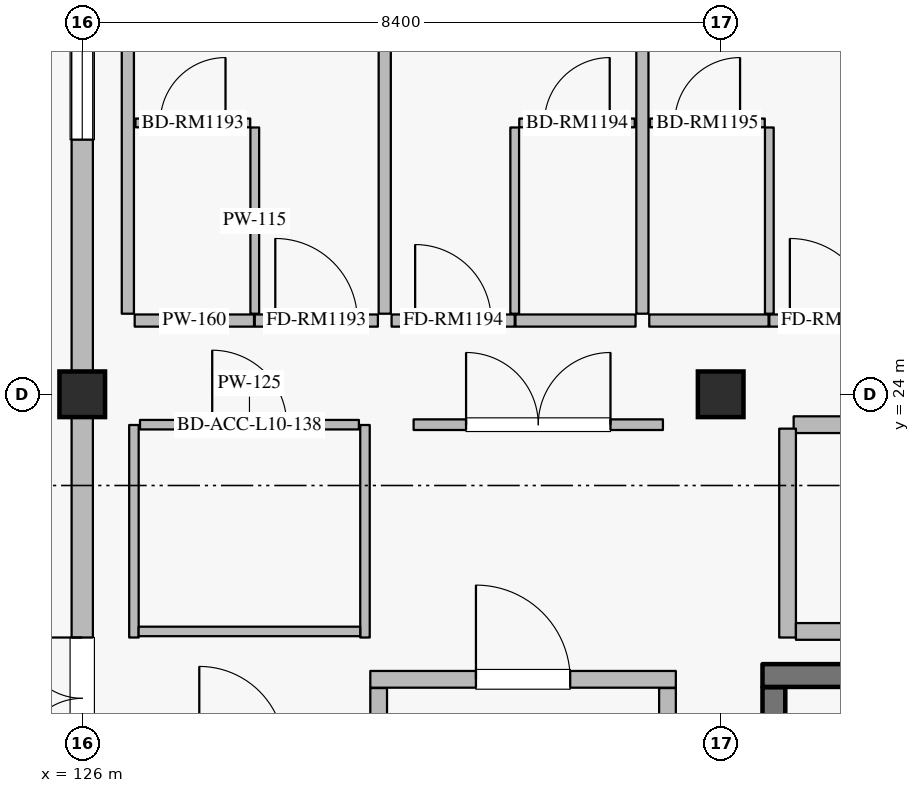
"""IFC4 building model, lengths in metres.
Left out: names, types, materials, properties, quantities, classifications, styles, units other than length and angle.
Written with IfcOpenShell. Run it as: python <this file> out.ifc"""

import sys

from ifc_helpers import new_model, si_unit, direction, frame, frame_2d, origin, origin_2d, place, context, subcontext, project, spatial, rectangle, extrude, element, fill, save


model = new_model("IFC4")
c1 = context("Model", 3, precision=1e-05, world=origin(), true_north=direction((0.0, 1.0)))
c2 = subcontext(c1, "Body", "Model", "MODEL_VIEW")
j1 = project(units=[si_unit("LENGTHUNIT", "METRE"), si_unit("PLANEANGLEUNIT", "RADIAN")], contexts=[c1])
p1 = place(None, origin())
s1 = spatial("IfcSite", under=j1, at=p1, CompositionType="ELEMENT")
p2 = place(p1, origin())
s2 = spatial("IfcBuilding", under=s1, at=p2, CompositionType="ELEMENT")
p3 = place(p2, frame((0.0, 0.0, 43.2)))
s3 = spatial("IfcBuildingStorey", under=s2, at=p3, CompositionType="ELEMENT", Elevation=43.2)
for number, where, z_axis, x_axis in (
    (1, (126.0, 24.0, 0.0), (0.0, 0.0, 1.0), (1.0, 0.0, 0.0)),
    (2, (134.4, 24.0, 0.0), (0.0, 0.0, 1.0), (1.0, 0.0, 0.0)),
):
    element("IfcColumn", number, at=place(p3, frame(where, z_axis=z_axis, x_axis=x_axis)), inside=s3, PredefinedType="COLUMN", context=c2, shape_type="SweptSolid", body=[
        extrude(rectangle(XDim=0.6, YDim=0.6, at=origin_2d()), origin(), (0.0, 0.0, 1.0), 4.2),
    ])
p4 = place(p3, frame((126.0, 16.3, 0.0), z_axis=(0.0, 0.0, 1.0), x_axis=(0.0, 1.0, 0.0)))
e3 = element("IfcWall", 3, at=p4, inside=s3, PredefinedType="SOLIDWALL", context=c2, shape_type="SweptSolid", body=[
    extrude(rectangle(XDim=7.4, YDim=0.28, at=frame_2d((3.7, 0.0))), origin(), (0.0, 0.0, 1.0), 3.3),
])
p5 = place(p4, frame((2.9, 0.0, 0.0)))
e4 = element("IfcOpeningElement", 4, at=p5, cuts=e3, PredefinedType="OPENING", context=c2, shape_type="SweptSolid", body=[
    extrude(rectangle(XDim=1.6, YDim=2.25, at=frame_2d((0.8, 1.125))), frame((0.0, 0.15, 0.0), z_axis=(0.0, -1.0, 0.0), x_axis=(1.0, 0.0, 0.0)), (0.0, 0.0, 1.0), 0.3),
])
p6 = place(p3, frame((126.0, 24.3, 0.0), z_axis=(0.0, 0.0, 1.0), x_axis=(0.0, 1.0, 0.0)))
e5 = element("IfcWall", 5, at=p6, inside=s3, PredefinedType="SOLIDWALL", context=c2, shape_type="SweptSolid", body=[
    extrude(rectangle(XDim=7.4, YDim=0.28, at=frame_2d((3.7, 0.0))), origin(), (0.0, 0.0, 1.0), 3.3),
])
p7 = place(p6, frame((3.05, 0.0, 0.75)))
e6 = element("IfcOpeningElement", 6, at=p7, cuts=e5, PredefinedType="OPENING", context=c2, shape_type="SweptSolid", body=[
    extrude(rectangle(XDim=1.3, YDim=1.65, at=frame_2d((0.65, 0.825))), frame((0.0, 0.15, 0.0), z_axis=(0.0, -1.0, 0.0), x_axis=(1.0, 0.0, 0.0)), (0.0, 0.0, 1.0), 0.3),
])
p8 = place(p3, frame((138.05, 20.3, 0.0), z_axis=(0.0, 0.0, 1.0), x_axis=(-1.0, 0.0, 0.0)))
e7 = element("IfcWall", 7, at=p8, inside=s3, PredefinedType="SHEAR", context=c2, shape_type="SweptSolid", body=[
    extrude(rectangle(XDim=3.1, YDim=0.3, at=frame_2d((1.55, 0.0))), origin(), (0.0, 0.0, 1.0), 3.935),
])
p9 = place(p3, frame((135.1, 20.145, 0.0), z_axis=(0.0, 0.0, 1.0), x_axis=(0.0, -1.0, 0.0)))
e8 = element("IfcWall", 8, at=p9, inside=s3, PredefinedType="SHEAR", context=c2, shape_type="SweptSolid", body=[
    extrude(rectangle(XDim=2.59, YDim=0.3, at=frame_2d((1.295, 0.0))), origin(), (0.0, 0.0, 1.0), 3.935),
])
p10 = place(p3, frame((129.9, 19.415, 0.0), z_axis=(0.0, 0.0, 1.0), x_axis=(0.0, 1.0, 0.0)))
e9 = element("IfcWall", 9, at=p10, inside=s3, PredefinedType="PARTITIONING", context=c2, shape_type="SweptSolid", body=[
    extrude(rectangle(XDim=0.72, YDim=0.22, at=frame_2d((0.36, 0.0))), origin(), (0.0, 0.0, 1.0), 3.935),
])
p11 = place(p3, frame((133.7, 16.605, 0.0), z_axis=(0.0, 0.0, 1.0), x_axis=(0.0, 1.0, 0.0)))
e10 = element("IfcWall", 10, at=p11, inside=s3, PredefinedType="PARTITIONING", context=c2, shape_type="SweptSolid", body=[
    extrude(rectangle(XDim=3.53, YDim=0.22, at=frame_2d((1.765, 0.0))), origin(), (0.0, 0.0, 1.0), 3.935),
])
p12 = place(p3, frame((129.79, 20.25, 0.0), z_axis=(0.0, 0.0, 1.0), x_axis=(1.0, 0.0, 0.0)))
e11 = element("IfcWall", 11, at=p12, inside=s3, PredefinedType="PARTITIONING", context=c2, shape_type="SweptSolid", body=[
    extrude(rectangle(XDim=4.02, YDim=0.22, at=frame_2d((2.01, 0.0))), origin(), (0.0, 0.0, 1.0), 3.935),
])
p13 = place(p12, frame((1.39, 0.0, 0.0)))
e12 = element("IfcOpeningElement", 12, at=p13, cuts=e11, PredefinedType="OPENING", context=c2, shape_type="SweptSolid", body=[
    extrude(rectangle(XDim=1.24, YDim=2.2, at=frame_2d((0.62, 1.1))), frame((0.0, 0.12, 0.0), z_axis=(0.0, -1.0, 0.0), x_axis=(1.0, 0.0, 0.0)), (0.0, 0.0, 1.0), 0.24),
])
p14 = place(p3, frame((126.69, 24.97, 0.0), z_axis=(0.0, 0.0, 1.0), x_axis=(1.0, 0.0, 0.0)))
e13 = element("IfcWall", 13, at=p14, inside=s3, PredefinedType="PARTITIONING", context=c2, shape_type="SweptSolid", body=[
    extrude(rectangle(XDim=1.57, YDim=0.16, at=frame_2d((0.785, 0.0))), origin(), (0.0, 0.0, 1.0), 3.935),
])
p15 = place(p3, frame((128.27, 24.97, 0.0), z_axis=(0.0, 0.0, 1.0), x_axis=(1.0, 0.0, 0.0)))
e14 = element("IfcWall", 14, at=p15, inside=s3, PredefinedType="PARTITIONING", context=c2, shape_type="SweptSolid", body=[
    extrude(rectangle(XDim=1.62, YDim=0.16, at=frame_2d((0.81, 0.0))), origin(), (0.0, 0.0, 1.0), 3.935),
])
p16 = place(p15, frame((0.27, 0.0, 0.0)))
e15 = element("IfcOpeningElement", 15, at=p16, cuts=e14, PredefinedType="OPENING", context=c2, shape_type="SweptSolid", body=[
    extrude(rectangle(XDim=1.08, YDim=2.3, at=frame_2d((0.54, 1.15))), frame((0.0, 0.09, 0.0), z_axis=(0.0, -1.0, 0.0), x_axis=(1.0, 0.0, 0.0)), (0.0, 0.0, 1.0), 0.18),
])
p17 = place(p3, frame((128.27, 25.06, 0.0), z_axis=(0.0, 0.0, 1.0), x_axis=(0.0, 1.0, 0.0)))
e16 = element("IfcWall", 16, at=p17, inside=s3, PredefinedType="PARTITIONING", context=c2, shape_type="SweptSolid", body=[
    extrude(rectangle(XDim=2.45, YDim=0.115, at=frame_2d((1.225, 0.0))), origin(), (0.0, 0.0, 1.0), 3.935),
])
p18 = place(p3, frame((126.7, 27.57, 0.0), z_axis=(0.0, 0.0, 1.0), x_axis=(1.0, 0.0, 0.0)))
e17 = element("IfcWall", 17, at=p18, inside=s3, PredefinedType="PARTITIONING", context=c2, shape_type="SweptSolid", body=[
    extrude(rectangle(XDim=1.51, YDim=0.115, at=frame_2d((0.755, 0.0))), origin(), (0.0, 0.0, 1.0), 3.935),
])
p19 = place(p18, frame((0.325, 0.0, 0.0)))
e18 = element("IfcOpeningElement", 18, at=p19, cuts=e17, PredefinedType="OPENING", context=c2, shape_type="SweptSolid", body=[
    extrude(rectangle(XDim=0.86, YDim=2.12, at=frame_2d((0.43, 1.06))), frame((0.0, 0.067, 0.0), z_axis=(0.0, -1.0, 0.0), x_axis=(1.0, 0.0, 0.0)), (0.0, 0.0, 1.0), 0.135),
])
p20 = place(p3, frame((126.6, 25.06, 0.0), z_axis=(0.0, 0.0, 1.0), x_axis=(0.0, 1.0, 0.0)))
e19 = element("IfcWall", 19, at=p20, inside=s3, PredefinedType="PARTITIONING", context=c2, shape_type="SweptSolid", body=[
    extrude(rectangle(XDim=6.6, YDim=0.16, at=frame_2d((3.3, 0.0))), origin(), (0.0, 0.0, 1.0), 3.935),
])
p21 = place(p3, frame((130.07, 24.97, 0.0), z_axis=(0.0, 0.0, 1.0), x_axis=(1.0, 0.0, 0.0)))
e20 = element("IfcWall", 20, at=p21, inside=s3, PredefinedType="PARTITIONING", context=c2, shape_type="SweptSolid", body=[
    extrude(rectangle(XDim=1.62, YDim=0.16, at=frame_2d((0.81, 0.0))), origin(), (0.0, 0.0, 1.0), 3.935),
])
p22 = place(p21, frame((0.31, 0.0, 0.0)))
e21 = element("IfcOpeningElement", 21, at=p22, cuts=e20, PredefinedType="OPENING", context=c2, shape_type="SweptSolid", body=[
    extrude(rectangle(XDim=1.0, YDim=2.25, at=frame_2d((0.5, 1.125))), frame((0.0, 0.09, 0.0), z_axis=(0.0, -1.0, 0.0), x_axis=(1.0, 0.0, 0.0)), (0.0, 0.0, 1.0), 0.18),
])
p23 = place(p3, frame((131.7, 24.97, 0.0), z_axis=(0.0, 0.0, 1.0), x_axis=(1.0, 0.0, 0.0)))
e22 = element("IfcWall", 22, at=p23, inside=s3, PredefinedType="PARTITIONING", context=c2, shape_type="SweptSolid", body=[
    extrude(rectangle(XDim=1.58, YDim=0.16, at=frame_2d((0.79, 0.0))), origin(), (0.0, 0.0, 1.0), 3.935),
])
p24 = place(p3, frame((131.69, 25.06, 0.0), z_axis=(0.0, 0.0, 1.0), x_axis=(0.0, 1.0, 0.0)))
e23 = element("IfcWall", 23, at=p24, inside=s3, PredefinedType="PARTITIONING", context=c2, shape_type="SweptSolid", body=[
    extrude(rectangle(XDim=2.45, YDim=0.115, at=frame_2d((1.225, 0.0))), origin(), (0.0, 0.0, 1.0), 3.935),
])
p25 = place(p3, frame((131.75, 27.57, 0.0), z_axis=(0.0, 0.0, 1.0), x_axis=(1.0, 0.0, 0.0)))
e24 = element("IfcWall", 24, at=p25, inside=s3, PredefinedType="PARTITIONING", context=c2, shape_type="SweptSolid", body=[
    extrude(rectangle(XDim=1.52, YDim=0.115, at=frame_2d((0.76, 0.0))), origin(), (0.0, 0.0, 1.0), 3.935),
])
p26 = place(p25, frame((0.33, 0.0, 0.0)))
e25 = element("IfcOpeningElement", 25, at=p26, cuts=e24, PredefinedType="OPENING", context=c2, shape_type="SweptSolid", body=[
    extrude(rectangle(XDim=0.86, YDim=2.12, at=frame_2d((0.43, 1.06))), frame((0.0, 0.067, 0.0), z_axis=(0.0, -1.0, 0.0), x_axis=(1.0, 0.0, 0.0)), (0.0, 0.0, 1.0), 0.135),
])
p27 = place(p3, frame((129.98, 25.06, 0.0), z_axis=(0.0, 0.0, 1.0), x_axis=(0.0, 1.0, 0.0)))
e26 = element("IfcWall", 26, at=p27, inside=s3, PredefinedType="PARTITIONING", context=c2, shape_type="SweptSolid", body=[
    extrude(rectangle(XDim=6.6, YDim=0.16, at=frame_2d((3.3, 0.0))), origin(), (0.0, 0.0, 1.0), 3.935),
])
p28 = place(p3, frame((133.46, 24.97, 0.0), z_axis=(0.0, 0.0, 1.0), x_axis=(1.0, 0.0, 0.0)))
e27 = element("IfcWall", 27, at=p28, inside=s3, PredefinedType="PARTITIONING", context=c2, shape_type="SweptSolid", body=[
    extrude(rectangle(XDim=1.57, YDim=0.16, at=frame_2d((0.785, 0.0))), origin(), (0.0, 0.0, 1.0), 3.935),
])
p29 = place(p3, frame((135.04, 24.97, 0.0), z_axis=(0.0, 0.0, 1.0), x_axis=(1.0, 0.0, 0.0)))
e28 = element("IfcWall", 28, at=p29, inside=s3, PredefinedType="PARTITIONING", context=c2, shape_type="SweptSolid", body=[
    extrude(rectangle(XDim=1.62, YDim=0.16, at=frame_2d((0.81, 0.0))), origin(), (0.0, 0.0, 1.0), 3.935),
])
p30 = place(p29, frame((0.27, 0.0, 0.0)))
e29 = element("IfcOpeningElement", 29, at=p30, cuts=e28, PredefinedType="OPENING", context=c2, shape_type="SweptSolid", body=[
    extrude(rectangle(XDim=1.08, YDim=2.3, at=frame_2d((0.54, 1.15))), frame((0.0, 0.09, 0.0), z_axis=(0.0, -1.0, 0.0), x_axis=(1.0, 0.0, 0.0)), (0.0, 0.0, 1.0), 0.18),
])
p31 = place(p3, frame((135.04, 25.06, 0.0), z_axis=(0.0, 0.0, 1.0), x_axis=(0.0, 1.0, 0.0)))
e30 = element("IfcWall", 30, at=p31, inside=s3, PredefinedType="PARTITIONING", context=c2, shape_type="SweptSolid", body=[
    extrude(rectangle(XDim=2.45, YDim=0.115, at=frame_2d((1.225, 0.0))), origin(), (0.0, 0.0, 1.0), 3.935),
])
p32 = place(p3, frame((133.47, 27.57, 0.0), z_axis=(0.0, 0.0, 1.0), x_axis=(1.0, 0.0, 0.0)))
e31 = element("IfcWall", 31, at=p32, inside=s3, PredefinedType="PARTITIONING", context=c2, shape_type="SweptSolid", body=[
    extrude(rectangle(XDim=1.51, YDim=0.115, at=frame_2d((0.755, 0.0))), origin(), (0.0, 0.0, 1.0), 3.935),
])
p33 = place(p32, frame((0.325, 0.0, 0.0)))
e32 = element("IfcOpeningElement", 32, at=p33, cuts=e31, PredefinedType="OPENING", context=c2, shape_type="SweptSolid", body=[
    extrude(rectangle(XDim=0.86, YDim=2.12, at=frame_2d((0.43, 1.06))), frame((0.0, 0.067, 0.0), z_axis=(0.0, -1.0, 0.0), x_axis=(1.0, 0.0, 0.0)), (0.0, 0.0, 1.0), 0.135),
])
p34 = place(p3, frame((133.37, 25.06, 0.0), z_axis=(0.0, 0.0, 1.0), x_axis=(0.0, 1.0, 0.0)))
e33 = element("IfcWall", 33, at=p34, inside=s3, PredefinedType="PARTITIONING", context=c2, shape_type="SweptSolid", body=[
    extrude(rectangle(XDim=6.6, YDim=0.16, at=frame_2d((3.3, 0.0))), origin(), (0.0, 0.0, 1.0), 3.935),
])
p35 = place(p3, frame((130.36, 23.6, 0.0), z_axis=(0.0, 0.0, 1.0), x_axis=(1.0, 0.0, 0.0)))
e34 = element("IfcWall", 34, at=p35, inside=s3, PredefinedType="PARTITIONING", context=c2, shape_type="SweptSolid", body=[
    extrude(rectangle(XDim=3.28, YDim=0.14, at=frame_2d((1.64, 0.0))), origin(), (0.0, 0.0, 1.0), 3.935),
])
p36 = place(p35, frame((0.69, 0.0, 0.0)))
e35 = element("IfcOpeningElement", 35, at=p36, cuts=e34, PredefinedType="OPENING", context=c2, shape_type="SweptSolid", body=[
    extrude(rectangle(XDim=1.9, YDim=2.4, at=frame_2d((0.95, 1.2))), frame((0.0, 0.08, 0.0), z_axis=(0.0, -1.0, 0.0), x_axis=(1.0, 0.0, 0.0)), (0.0, 0.0, 1.0), 0.16),
])
p37 = place(p3, frame((135.36, 23.6, 0.0), z_axis=(0.0, 0.0, 1.0), x_axis=(1.0, 0.0, 0.0)))
e36 = element("IfcWall", 36, at=p37, inside=s3, PredefinedType="PARTITIONING", context=c2, shape_type="SweptSolid", body=[
    extrude(rectangle(XDim=2.88, YDim=0.22, at=frame_2d((1.44, 0.0))), origin(), (0.0, 0.0, 1.0), 3.935),
])
p38 = place(p37, frame((0.97, 0.0, 0.0)))
e37 = element("IfcOpeningElement", 37, at=p38, cuts=e36, PredefinedType="OPENING", context=c2, shape_type="SweptSolid", body=[
    extrude(rectangle(XDim=0.94, YDim=2.15, at=frame_2d((0.47, 1.075))), frame((0.0, 0.12, 0.0), z_axis=(0.0, -1.0, 0.0), x_axis=(1.0, 0.0, 0.0)), (0.0, 0.0, 1.0), 0.24),
])
p39 = place(p3, frame((126.76, 23.6, 0.0), z_axis=(0.0, 0.0, 1.0), x_axis=(1.0, 0.0, 0.0)))
e38 = element("IfcWall", 38, at=p39, inside=s3, PredefinedType="PARTITIONING", context=c2, shape_type="SweptSolid", body=[
    extrude(rectangle(XDim=2.88, YDim=0.125, at=frame_2d((1.44, 0.0))), origin(), (0.0, 0.0, 1.0), 3.935),
])
p40 = place(p39, frame((0.95, 0.0, 0.0)))
e39 = element("IfcOpeningElement", 39, at=p40, cuts=e38, PredefinedType="OPENING", context=c2, shape_type="SweptSolid", body=[
    extrude(rectangle(XDim=0.98, YDim=2.15, at=frame_2d((0.49, 1.075))), frame((0.0, 0.073, 0.0), z_axis=(0.0, -1.0, 0.0), x_axis=(1.0, 0.0, 0.0)), (0.0, 0.0, 1.0), 0.145),
])
p41 = place(p3, frame((135.28, 20.8, 0.0), z_axis=(0.0, 0.0, 1.0), x_axis=(0.0, 1.0, 0.0)))
e40 = element("IfcWall", 40, at=p41, inside=s3, PredefinedType="PARTITIONING", context=c2, shape_type="SweptSolid", body=[
    extrude(rectangle(XDim=2.748, YDim=0.22, at=frame_2d((1.374, 0.0))), origin(), (0.0, 0.0, 1.0), 3.935),
])
p42 = place(p3, frame((135.39, 20.88, 0.0), z_axis=(0.0, 0.0, 1.0), x_axis=(1.0, 0.0, 0.0)))
e41 = element("IfcWall", 41, at=p42, inside=s3, PredefinedType="PARTITIONING", context=c2, shape_type="SweptSolid", body=[
    extrude(rectangle(XDim=2.82, YDim=0.22, at=frame_2d((1.41, 0.0))), origin(), (0.0, 0.0, 1.0), 3.935),
])
for number, where, z_axis, x_axis in (
    (42, (126.68, 20.8, 0.0), (0.0, 0.0, 1.0), (0.0, 1.0, 0.0)),
    (43, (129.72, 20.8, 0.0), (0.0, 0.0, 1.0), (0.0, 1.0, 0.0)),
):
    element("IfcWall", number, at=place(p3, frame(where, z_axis=z_axis, x_axis=x_axis)), inside=s3, PredefinedType="PARTITIONING", context=c2, shape_type="SweptSolid", body=[
        extrude(rectangle(XDim=2.796, YDim=0.125, at=frame_2d((1.398, 0.0))), origin(), (0.0, 0.0, 1.0), 3.935),
    ])
p43 = place(p3, frame((126.742, 20.88, 0.0), z_axis=(0.0, 0.0, 1.0), x_axis=(1.0, 0.0, 0.0)))
e44 = element("IfcWall", 44, at=p43, inside=s3, PredefinedType="PARTITIONING", context=c2, shape_type="SweptSolid", body=[
    extrude(rectangle(XDim=2.915, YDim=0.125, at=frame_2d((1.458, 0.0))), origin(), (0.0, 0.0, 1.0), 3.935),
])
p44 = place(p5, origin())
e45 = element("IfcDoor", 45, at=p44, inside=s3, OperationType="DOUBLE_DOOR_SINGLE_SWING", PredefinedType="DOOR", context=c2, shape_type="SweptSolid", body=[
    extrude(rectangle(XDim=1.6, YDim=2.25, at=frame_2d((0.8, 1.125))), frame((0.0, 0.025, 0.0), z_axis=(0.0, -1.0, 0.0), x_axis=(1.0, 0.0, 0.0)), (0.0, 0.0, 1.0), 0.05),
])
fill(e4, e45)
p45 = place(p7, origin())
e46 = element("IfcWindow", 46, at=p45, inside=s3, PartitioningType="SINGLE_PANEL", PredefinedType="WINDOW", context=c2, shape_type="SweptSolid", body=[
    extrude(rectangle(XDim=1.3, YDim=1.65, at=frame_2d((0.65, 0.825))), frame((0.0, 0.03, 0.0), z_axis=(0.0, -1.0, 0.0), x_axis=(1.0, 0.0, 0.0)), (0.0, 0.0, 1.0), 0.06),
])
fill(e6, e46)
p46 = place(p13, origin())
e47 = element("IfcDoor", 47, at=p46, inside=s3, OperationType="SINGLE_SWING_LEFT", PredefinedType="DOOR", context=c2, shape_type="SweptSolid", body=[
    extrude(rectangle(XDim=1.24, YDim=2.2, at=frame_2d((0.62, 1.1))), frame((0.0, 0.025, 0.0), z_axis=(0.0, -1.0, 0.0), x_axis=(1.0, 0.0, 0.0)), (0.0, 0.0, 1.0), 0.05),
])
fill(e12, e47)
p47 = place(p16, origin())
e48 = element("IfcDoor", 48, at=p47, inside=s3, OperationType="SINGLE_SWING_LEFT", PredefinedType="DOOR", context=c2, shape_type="SweptSolid", body=[
    extrude(rectangle(XDim=1.08, YDim=2.3, at=frame_2d((0.54, 1.15))), frame((0.0, 0.025, 0.0), z_axis=(0.0, -1.0, 0.0), x_axis=(1.0, 0.0, 0.0)), (0.0, 0.0, 1.0), 0.05),
])
fill(e15, e48)
p48 = place(p19, origin())
e49 = element("IfcDoor", 49, at=p48, inside=s3, OperationType="SINGLE_SWING_RIGHT", PredefinedType="DOOR", context=c2, shape_type="SweptSolid", body=[
    extrude(rectangle(XDim=0.86, YDim=2.12, at=frame_2d((0.43, 1.06))), frame((0.0, 0.025, 0.0), z_axis=(0.0, -1.0, 0.0), x_axis=(1.0, 0.0, 0.0)), (0.0, 0.0, 1.0), 0.05),
])
fill(e18, e49)
p49 = place(p22, origin())
e50 = element("IfcDoor", 50, at=p49, inside=s3, OperationType="SINGLE_SWING_LEFT", PredefinedType="DOOR", context=c2, shape_type="SweptSolid", body=[
    extrude(rectangle(XDim=1.0, YDim=2.25, at=frame_2d((0.5, 1.125))), frame((0.0, 0.025, 0.0), z_axis=(0.0, -1.0, 0.0), x_axis=(1.0, 0.0, 0.0)), (0.0, 0.0, 1.0), 0.05),
])
fill(e21, e50)
p50 = place(p26, origin())
e51 = element("IfcDoor", 51, at=p50, inside=s3, OperationType="SINGLE_SWING_RIGHT", PredefinedType="DOOR", context=c2, shape_type="SweptSolid", body=[
    extrude(rectangle(XDim=0.86, YDim=2.12, at=frame_2d((0.43, 1.06))), frame((0.0, 0.025, 0.0), z_axis=(0.0, -1.0, 0.0), x_axis=(1.0, 0.0, 0.0)), (0.0, 0.0, 1.0), 0.05),
])
fill(e25, e51)
p51 = place(p30, origin())
e52 = element("IfcDoor", 52, at=p51, inside=s3, OperationType="SINGLE_SWING_LEFT", PredefinedType="DOOR", context=c2, shape_type="SweptSolid", body=[
    extrude(rectangle(XDim=1.08, YDim=2.3, at=frame_2d((0.54, 1.15))), frame((0.0, 0.025, 0.0), z_axis=(0.0, -1.0, 0.0), x_axis=(1.0, 0.0, 0.0)), (0.0, 0.0, 1.0), 0.05),
])
fill(e29, e52)
p52 = place(p33, origin())
e53 = element("IfcDoor", 53, at=p52, inside=s3, OperationType="SINGLE_SWING_RIGHT", PredefinedType="DOOR", context=c2, shape_type="SweptSolid", body=[
    extrude(rectangle(XDim=0.86, YDim=2.12, at=frame_2d((0.43, 1.06))), frame((0.0, 0.025, 0.0), z_axis=(0.0, -1.0, 0.0), x_axis=(1.0, 0.0, 0.0)), (0.0, 0.0, 1.0), 0.05),
])
fill(e32, e53)
p53 = place(p36, origin())
e54 = element("IfcDoor", 54, at=p53, inside=s3, OperationType="DOUBLE_DOOR_SINGLE_SWING", PredefinedType="DOOR", context=c2, shape_type="SweptSolid", body=[
    extrude(rectangle(XDim=1.9, YDim=2.4, at=frame_2d((0.95, 1.2))), frame((0.0, 0.025, 0.0), z_axis=(0.0, -1.0, 0.0), x_axis=(1.0, 0.0, 0.0)), (0.0, 0.0, 1.0), 0.05),
])
fill(e35, e54)
p54 = place(p40, origin())
e55 = element("IfcDoor", 55, at=p54, inside=s3, OperationType="SINGLE_SWING_LEFT", PredefinedType="DOOR", context=c2, shape_type="SweptSolid", body=[
    extrude(rectangle(XDim=0.98, YDim=2.15, at=frame_2d((0.49, 1.075))), frame((0.0, 0.025, 0.0), z_axis=(0.0, -1.0, 0.0), x_axis=(1.0, 0.0, 0.0)), (0.0, 0.0, 1.0), 0.05),
])
fill(e39, e55)
save(model, sys.argv[1])
